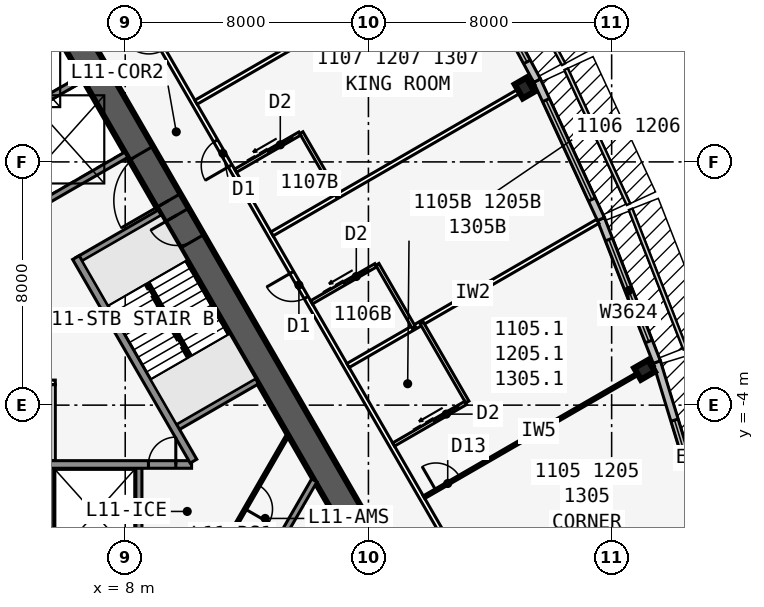
"""IFC4 building model, lengths in metres.
Left out: names, types, materials, properties, quantities, classifications, styles, units other than length and angle.
Written with IfcOpenShell. Run it as: python <this file> out.ifc"""

import sys

from ifc_helpers import new_model, si_unit, direction, frame, frame_2d, origin, origin_2d, place, context, subcontext, project, spatial, rectangle, i_section, extrude, element, fill, save


model = new_model("IFC4")
c1 = context("Model", 3, precision=1e-05, world=origin(), true_north=direction((0.0, 1.0)))
c2 = subcontext(c1, "Body", "Model", "MODEL_VIEW")
j1 = project(units=[si_unit("LENGTHUNIT", "METRE"), si_unit("PLANEANGLEUNIT", "RADIAN")], contexts=[c1])
p1 = place(None, origin())
s1 = spatial("IfcSite", under=j1, at=p1, CompositionType="ELEMENT")
p2 = place(p1, origin())
s2 = spatial("IfcBuilding", under=s1, at=p2, CompositionType="ELEMENT")
p3 = place(p2, frame((0.0, 0.0, 48.9)))
s3 = spatial("IfcBuildingStorey", under=s2, at=p3, CompositionType="ELEMENT", Elevation=48.9)
p4 = place(p3, frame((-0.55, -5.951, 0.0), z_axis=(0.0, 0.0, 1.0), x_axis=(1.0, 0.0, 0.0)))
e1 = element("IfcWall", 1, at=p4, inside=s3, PredefinedType="SOLIDWALL", context=c2, shape_type="SweptSolid", body=[
    extrude(rectangle(XDim=10.733, YDim=0.25, at=frame_2d((5.366, 0.0))), origin(), (0.0, 0.0, 1.0), 3.235),
])
p5 = place(p4, frame((9.314, 0.0, 0.0)))
e2 = element("IfcOpeningElement", 2, at=p5, cuts=e1, PredefinedType="OPENING", context=c2, shape_type="SweptSolid", body=[
    extrude(rectangle(XDim=0.9, YDim=2.13, at=frame_2d((0.45, 1.065))), frame((0.0, 0.135, 0.0), z_axis=(0.0, -1.0, 0.0), x_axis=(1.0, 0.0, 0.0)), (0.0, 0.0, 1.0), 0.27),
])
p6 = place(p4, frame((1.05, 0.0, 0.0)))
e3 = element("IfcOpeningElement", 3, at=p6, cuts=e1, PredefinedType="OPENING", context=c2, shape_type="SweptSolid", body=[
    extrude(rectangle(XDim=1.1, YDim=2.13, at=frame_2d((0.55, 1.065))), frame((0.0, 0.135, 0.0), z_axis=(0.0, -1.0, 0.0), x_axis=(1.0, 0.0, 0.0)), (0.0, 0.0, 1.0), 0.27),
])
p7 = place(p4, frame((4.05, 0.0, 0.0)))
e4 = element("IfcOpeningElement", 4, at=p7, cuts=e1, PredefinedType="OPENING", context=c2, shape_type="SweptSolid", body=[
    extrude(rectangle(XDim=1.1, YDim=2.13, at=frame_2d((0.55, 1.065))), frame((0.0, 0.135, 0.0), z_axis=(0.0, -1.0, 0.0), x_axis=(1.0, 0.0, 0.0)), (0.0, 0.0, 1.0), 0.27),
])
for number, where, z_axis, x_axis in (
    (5, (5.55, -5.951, 0.0), (0.0, 0.0, 1.0), (0.0, -1.0, 0.0)),
    (6, (8.45, -5.951, 0.0), (0.0, 0.0, 1.0), (0.0, -1.0, 0.0)),
):
    element("IfcWall", number, at=place(p3, frame(where, z_axis=z_axis, x_axis=x_axis)), inside=s3, PredefinedType="SOLIDWALL", context=c2, shape_type="SweptSolid", body=[
        extrude(rectangle(XDim=3.125, YDim=0.2, at=frame_2d((1.562, 0.0))), origin(), (0.0, 0.0, 1.0), 3.235),
    ])
p8 = place(p3, frame((16.5, -9.526, 0.0), z_axis=(0.0, 0.0, 1.0), x_axis=(-0.499999749417, 0.866025548458, 0.0)))
e7 = element("IfcWall", 7, at=p8, inside=s3, PredefinedType="SHEAR", context=c2, shape_type="SweptSolid", body=[
    extrude(rectangle(XDim=33.0, YDim=0.9, at=frame_2d((16.5, 0.0))), origin(), (0.0, 0.0, 1.0), 3.4),
])
p9 = place(p8, frame((14.15, 0.0, 0.0)))
e8 = element("IfcOpeningElement", 8, at=p9, cuts=e7, PredefinedType="OPENING", context=c2, shape_type="SweptSolid", body=[
    extrude(rectangle(XDim=1.8, YDim=2.13, at=frame_2d((0.9, 1.065))), frame((0.0, 0.46, 0.0), z_axis=(0.0, -1.0, 0.0), x_axis=(1.0, 0.0, 0.0)), (0.0, 0.0, 1.0), 0.92),
])
p10 = place(p8, frame((12.6, 0.0, 0.0)))
e9 = element("IfcOpeningElement", 9, at=p10, cuts=e7, PredefinedType="OPENING", context=c2, shape_type="SweptSolid", body=[
    extrude(rectangle(XDim=1.0, YDim=2.13, at=frame_2d((0.5, 1.065))), frame((0.0, 0.46, 0.0), z_axis=(0.0, -1.0, 0.0), x_axis=(1.0, 0.0, 0.0)), (0.0, 0.0, 1.0), 0.92),
])
p11 = place(p3, frame((10.245, -5.843, 0.0), z_axis=(0.0, 0.0, 1.0), x_axis=(-0.499993009313, 0.866029439822, 0.0)))
e10 = element("IfcWall", 10, at=p11, inside=s3, PredefinedType="SOLIDWALL", context=c2, shape_type="SweptSolid", body=[
    extrude(rectangle(XDim=7.733, YDim=0.25, at=frame_2d((3.866, 0.0))), origin(), (0.0, 0.0, 1.0), 3.235),
])
for number, where, z_axis, x_axis in (
    (11, (9.629, -4.775, 0.0), (0.0, 0.0, 1.0), (0.866, 0.5, 0.0)),
    (12, (6.429, 0.767, 0.0), (0.0, 0.0, 1.0), (0.866, 0.5, 0.0)),
    (13, (5.329, 2.673, 0.0), (0.0, 0.0, 1.0), (0.866, 0.5, 0.0)),
    (14, (3.879, 5.184, 0.0), (0.0, 0.0, 1.0), (0.866, 0.5, 0.0)),
):
    element("IfcWall", number, at=place(p3, frame(where, z_axis=z_axis, x_axis=x_axis)), inside=s3, PredefinedType="SOLIDWALL", context=c2, shape_type="SweptSolid", body=[
        extrude(rectangle(XDim=3.125, YDim=0.2, at=frame_2d((1.562, 0.0))), origin(), (0.0, 0.0, 1.0), 3.235),
    ])
for number, where, z_axis, x_axis in (
    (15, (25.083, -2.839, 0.0), (0.0, 0.0, 1.0), (-0.5, 0.866, 0.0)),
    (16, (21.137, 6.43, 0.0), (0.0, 0.0, 1.0), (0.866, 0.5, 0.0)),
):
    element("IfcColumn", number, at=place(p3, frame(where, z_axis=z_axis, x_axis=x_axis)), inside=s3, PredefinedType="COLUMN", context=c2, shape_type="SweptSolid", body=[
        extrude(i_section(OverallWidth=0.442, OverallDepth=0.531, WebThickness=0.066, FlangeThickness=0.106, at=origin_2d()), origin(), (0.0, 0.0, 1.0), 3.4),
    ])
p12 = place(p3, frame((15.312, 8.84, 0.0), z_axis=(0.0, 0.0, 1.0), x_axis=(0.866025403784, 0.5, 0.0)))
e17 = element("IfcColumn", 17, at=p12, inside=s3, PredefinedType="COLUMN", context=c2, shape_type="SweptSolid", body=[
    extrude(rectangle(XDim=2.4, YDim=2.4, at=origin_2d()), origin(), (0.0, 0.0, 1.0), 3.4),
])
p13 = place(p3, frame((27.88, -10.429, 0.0), z_axis=(0.0, 0.0, 1.0), x_axis=(-0.2919790669, 0.956424709265, 0.0)))
e18 = element("IfcWall", 18, at=p13, inside=s3, PredefinedType="STANDARD", context=c2, shape_type="SweptSolid", body=[
    extrude(rectangle(XDim=8.211, YDim=0.25, at=frame_2d((4.105, 0.0))), origin(), (0.0, 0.0, 1.0), 3.235),
])
p14 = place(p13, frame((2.006, 0.0, 0.45)))
e19 = element("IfcOpeningElement", 19, at=p14, cuts=e18, PredefinedType="OPENING", context=c2, shape_type="SweptSolid", body=[
    extrude(rectangle(XDim=4.2, YDim=2.4, at=frame_2d((2.1, 1.2))), frame((0.0, 0.135, 0.0), z_axis=(0.0, -1.0, 0.0), x_axis=(1.0, 0.0, 0.0)), (0.0, 0.0, 1.0), 0.27),
])
p15 = place(p3, frame((25.486, -2.584, 0.0), z_axis=(0.0, 0.0, 1.0), x_axis=(-0.364013463868, 0.931393685894, 0.0)))
e20 = element("IfcWall", 20, at=p15, inside=s3, PredefinedType="STANDARD", context=c2, shape_type="SweptSolid", body=[
    extrude(rectangle(XDim=5.058, YDim=0.25, at=frame_2d((2.529, 0.0))), origin(), (0.0, 0.0, 1.0), 3.235),
])
p16 = place(p15, frame((0.729, 0.0, 0.45)))
e21 = element("IfcOpeningElement", 21, at=p16, cuts=e20, PredefinedType="OPENING", context=c2, shape_type="SweptSolid", body=[
    extrude(rectangle(XDim=3.6, YDim=2.4, at=frame_2d((1.8, 1.2))), frame((0.0, 0.135, 0.0), z_axis=(0.0, -1.0, 0.0), x_axis=(1.0, 0.0, 0.0)), (0.0, 0.0, 1.0), 0.27),
])
p17 = place(p3, frame((23.648, 2.119, 0.0), z_axis=(0.0, 0.0, 1.0), x_axis=(-0.419203100754, 0.907892482796, 0.0)))
e22 = element("IfcWall", 22, at=p17, inside=s3, PredefinedType="STANDARD", context=c2, shape_type="SweptSolid", body=[
    extrude(rectangle(XDim=5.021, YDim=0.25, at=frame_2d((2.51, 0.0))), origin(), (0.0, 0.0, 1.0), 3.235),
])
p18 = place(p17, frame((0.71, 0.0, 0.45)))
e23 = element("IfcOpeningElement", 23, at=p18, cuts=e22, PredefinedType="OPENING", context=c2, shape_type="SweptSolid", body=[
    extrude(rectangle(XDim=3.6, YDim=2.4, at=frame_2d((1.8, 1.2))), frame((0.0, 0.135, 0.0), z_axis=(0.0, -1.0, 0.0), x_axis=(1.0, 0.0, 0.0)), (0.0, 0.0, 1.0), 0.27),
])
p19 = place(p3, frame((21.547, 6.671, 0.0), z_axis=(0.0, 0.0, 1.0), x_axis=(-0.473412820489, 0.880840678782, 0.0)))
e24 = element("IfcWall", 24, at=p19, inside=s3, PredefinedType="STANDARD", context=c2, shape_type="SweptSolid", body=[
    extrude(rectangle(XDim=5.002, YDim=0.25, at=frame_2d((2.501, 0.0))), origin(), (0.0, 0.0, 1.0), 3.235),
])
p20 = place(p19, frame((0.701, 0.0, 0.45)))
e25 = element("IfcOpeningElement", 25, at=p20, cuts=e24, PredefinedType="OPENING", context=c2, shape_type="SweptSolid", body=[
    extrude(rectangle(XDim=3.6, YDim=2.4, at=frame_2d((1.8, 1.2))), frame((0.0, 0.135, 0.0), z_axis=(0.0, -1.0, 0.0), x_axis=(1.0, 0.0, 0.0)), (0.0, 0.0, 1.0), 0.27),
])
p21 = place(p3, frame((20.027, -10.985, 0.0), z_axis=(0.0, 0.0, 1.0), x_axis=(-0.500001677587, 0.866024435227, 0.0)))
e26 = element("IfcWall", 26, at=p21, inside=s3, PredefinedType="PARTITIONING", context=c2, shape_type="SweptSolid", body=[
    extrude(rectangle(XDim=39.054, YDim=0.15, at=frame_2d((19.527, 0.0))), origin(), (0.0, 0.0, 1.0), 3.235),
])
p22 = place(p21, frame((1.558, 0.0, 0.0)))
e27 = element("IfcOpeningElement", 27, at=p22, cuts=e26, PredefinedType="OPENING", context=c2, shape_type="SweptSolid", body=[
    extrude(rectangle(XDim=0.95, YDim=2.13, at=frame_2d((0.475, 1.065))), frame((0.0, 0.085, 0.0), z_axis=(0.0, -1.0, 0.0), x_axis=(1.0, 0.0, 0.0)), (0.0, 0.0, 1.0), 0.17),
])
p23 = place(p21, frame((12.152, 0.0, 0.0)))
e28 = element("IfcOpeningElement", 28, at=p23, cuts=e26, PredefinedType="OPENING", context=c2, shape_type="SweptSolid", body=[
    extrude(rectangle(XDim=0.95, YDim=2.13, at=frame_2d((0.475, 1.065))), frame((0.0, 0.085, 0.0), z_axis=(0.0, -1.0, 0.0), x_axis=(1.0, 0.0, 0.0)), (0.0, 0.0, 1.0), 0.17),
])
p24 = place(p21, frame((17.152, 0.0, 0.0)))
e29 = element("IfcOpeningElement", 29, at=p24, cuts=e26, PredefinedType="OPENING", context=c2, shape_type="SweptSolid", body=[
    extrude(rectangle(XDim=0.95, YDim=2.13, at=frame_2d((0.475, 1.065))), frame((0.0, 0.085, 0.0), z_axis=(0.0, -1.0, 0.0), x_axis=(1.0, 0.0, 0.0)), (0.0, 0.0, 1.0), 0.17),
])
p25 = place(p21, frame((21.552, 0.0, 0.0)))
e30 = element("IfcOpeningElement", 30, at=p25, cuts=e26, PredefinedType="OPENING", context=c2, shape_type="SweptSolid", body=[
    extrude(rectangle(XDim=0.95, YDim=2.13, at=frame_2d((0.475, 1.065))), frame((0.0, 0.085, 0.0), z_axis=(0.0, -1.0, 0.0), x_axis=(1.0, 0.0, 0.0)), (0.0, 0.0, 1.0), 0.17),
])
p26 = place(p21, frame((32.152, 0.0, 0.0)))
e31 = element("IfcOpeningElement", 31, at=p26, cuts=e26, PredefinedType="OPENING", context=c2, shape_type="SweptSolid", body=[
    extrude(rectangle(XDim=0.95, YDim=2.13, at=frame_2d((0.475, 1.065))), frame((0.0, 0.085, 0.0), z_axis=(0.0, -1.0, 0.0), x_axis=(1.0, 0.0, 0.0)), (0.0, 0.0, 1.0), 0.17),
])
p27 = place(p21, frame((37.752, 0.0, 0.0)))
e32 = element("IfcOpeningElement", 32, at=p27, cuts=e26, PredefinedType="OPENING", context=c2, shape_type="SweptSolid", body=[
    extrude(rectangle(XDim=0.95, YDim=2.13, at=frame_2d((0.475, 1.065))), frame((0.0, 0.085, 0.0), z_axis=(0.0, -1.0, 0.0), x_axis=(1.0, 0.0, 0.0)), (0.0, 0.0, 1.0), 0.17),
])
p28 = place(p3, frame((17.829, -7.027, 0.0), z_axis=(0.0, 0.0, 1.0), x_axis=(0.866032659912, 0.499987431809, 0.0)))
e33 = element("IfcWall", 33, at=p28, inside=s3, PredefinedType="PARTITIONING", context=c2, shape_type="SweptSolid", body=[
    extrude(rectangle(XDim=8.72, YDim=0.1, at=frame_2d((4.36, 0.0))), origin(), (0.0, 0.0, 1.0), 2.389),
])
p29 = place(p28, frame((0.45, 0.0, 0.0)))
e34 = element("IfcOpeningElement", 34, at=p29, cuts=e33, PredefinedType="OPENING", context=c2, shape_type="SweptSolid", body=[
    extrude(rectangle(XDim=0.9, YDim=2.13, at=frame_2d((0.45, 1.065))), frame((0.0, 0.06, 0.0), z_axis=(0.0, -1.0, 0.0), x_axis=(1.0, 0.0, 0.0)), (0.0, 0.0, 1.0), 0.12),
])
p30 = place(p3, frame((15.329, -2.697, 0.0), z_axis=(0.0, 0.0, 1.0), x_axis=(0.866018409083, 0.500012114982, 0.0)))
e35 = element("IfcWall", 35, at=p30, inside=s3, PredefinedType="PARTITIONING", context=c2, shape_type="SweptSolid", body=[
    extrude(rectangle(XDim=9.485, YDim=0.15, at=frame_2d((4.742, 0.0))), origin(), (0.0, 0.0, 1.0), 2.389),
])
p31 = place(p3, frame((12.829, 1.633, 0.0), z_axis=(0.0, 0.0, 1.0), x_axis=(0.866026934769, 0.499997348248, 0.0)))
e36 = element("IfcWall", 36, at=p31, inside=s3, PredefinedType="PARTITIONING", context=c2, shape_type="SweptSolid", body=[
    extrude(rectangle(XDim=9.943, YDim=0.15, at=frame_2d((4.971, 0.0))), origin(), (0.0, 0.0, 1.0), 2.389),
])
p32 = place(p3, frame((10.329, 5.963, 0.0), z_axis=(0.0, 0.0, 1.0), x_axis=(0.866021688545, 0.500006434927, 0.0)))
e37 = element("IfcWall", 37, at=p32, inside=s3, PredefinedType="PARTITIONING", context=c2, shape_type="SweptSolid", body=[
    extrude(rectangle(XDim=10.096, YDim=0.15, at=frame_2d((5.048, 0.0))), origin(), (0.0, 0.0, 1.0), 2.389),
])
p33 = place(p3, frame((19.253, -3.895, 0.0), z_axis=(0.0, 0.0, 1.0), x_axis=(-0.499990139034, 0.866031096941, 0.0)))
e38 = element("IfcWall", 38, at=p33, inside=s3, PredefinedType="PLUMBINGWALL", context=c2, shape_type="SweptSolid", body=[
    extrude(rectangle(XDim=3.0, YDim=0.12, at=frame_2d((1.5, 0.0))), origin(), (0.0, 0.0, 1.0), 3.235),
])
p34 = place(p3, frame((16.829, -5.295, 0.0), z_axis=(0.0, 0.0, 1.0), x_axis=(0.866035715982, 0.499982138324, 0.0)))
e39 = element("IfcWall", 39, at=p34, inside=s3, PredefinedType="PLUMBINGWALL", context=c2, shape_type="SweptSolid", body=[
    extrude(rectangle(XDim=2.74, YDim=0.12, at=frame_2d((1.37, 0.0))), origin(), (0.0, 0.0, 1.0), 3.235),
])
p35 = place(p34, frame((1.55, 0.0, 0.0)))
e40 = element("IfcOpeningElement", 40, at=p35, cuts=e39, PredefinedType="OPENING", context=c2, shape_type="SweptSolid", body=[
    extrude(rectangle(XDim=0.9, YDim=2.13, at=frame_2d((0.45, 1.065))), frame((0.0, 0.07, 0.0), z_axis=(0.0, -1.0, 0.0), x_axis=(1.0, 0.0, 0.0)), (0.0, 0.0, 1.0), 0.14),
])
p36 = place(p3, frame((17.493, -1.447, 0.0), z_axis=(0.0, 0.0, 1.0), x_axis=(-0.500001309137, 0.866024647952, 0.0)))
e41 = element("IfcWall", 41, at=p36, inside=s3, PredefinedType="PLUMBINGWALL", context=c2, shape_type="SweptSolid", body=[
    extrude(rectangle(XDim=2.4, YDim=0.12, at=frame_2d((1.2, 0.0))), origin(), (0.0, 0.0, 1.0), 3.235),
])
p37 = place(p3, frame((14.128, -0.619, 0.0), z_axis=(0.0, 0.0, 1.0), x_axis=(0.866048967903, 0.499959183527, 0.0)))
e42 = element("IfcWall", 42, at=p37, inside=s3, PredefinedType="PLUMBINGWALL", context=c2, shape_type="SweptSolid", body=[
    extrude(rectangle(XDim=2.44, YDim=0.12, at=frame_2d((1.22, 0.0))), origin(), (0.0, 0.0, 1.0), 3.235),
])
p38 = place(p37, frame((1.25, 0.0, 0.0)))
e43 = element("IfcOpeningElement", 43, at=p38, cuts=e42, PredefinedType="OPENING", context=c2, shape_type="SweptSolid", body=[
    extrude(rectangle(XDim=0.9, YDim=2.13, at=frame_2d((0.45, 1.065))), frame((0.0, 0.07, 0.0), z_axis=(0.0, -1.0, 0.0), x_axis=(1.0, 0.0, 0.0)), (0.0, 0.0, 1.0), 0.14),
])
p39 = place(p3, frame((14.993, 2.883, 0.0), z_axis=(0.0, 0.0, 1.0), x_axis=(-0.500001309137, 0.866024647952, 0.0)))
e44 = element("IfcWall", 44, at=p39, inside=s3, PredefinedType="PLUMBINGWALL", context=c2, shape_type="SweptSolid", body=[
    extrude(rectangle(XDim=2.4, YDim=0.12, at=frame_2d((1.2, 0.0))), origin(), (0.0, 0.0, 1.0), 3.235),
])
p40 = place(p3, frame((11.628, 3.711, 0.0), z_axis=(0.0, 0.0, 1.0), x_axis=(0.866048967903, 0.499959183527, 0.0)))
e45 = element("IfcWall", 45, at=p40, inside=s3, PredefinedType="PLUMBINGWALL", context=c2, shape_type="SweptSolid", body=[
    extrude(rectangle(XDim=2.44, YDim=0.12, at=frame_2d((1.22, 0.0))), origin(), (0.0, 0.0, 1.0), 3.235),
])
p41 = place(p40, frame((1.25, 0.0, 0.0)))
e46 = element("IfcOpeningElement", 46, at=p41, cuts=e45, PredefinedType="OPENING", context=c2, shape_type="SweptSolid", body=[
    extrude(rectangle(XDim=0.9, YDim=2.13, at=frame_2d((0.45, 1.065))), frame((0.0, 0.07, 0.0), z_axis=(0.0, -1.0, 0.0), x_axis=(1.0, 0.0, 0.0)), (0.0, 0.0, 1.0), 0.14),
])
p42 = place(p3, frame((-2.65, -3.251, 0.0), z_axis=(0.0, 0.0, 1.0), x_axis=(1.0, 0.0, 0.0)))
e47 = element("IfcWall", 47, at=p42, inside=s3, PredefinedType="PARTITIONING", context=c2, shape_type="SweptSolid", body=[
    extrude(rectangle(XDim=8.35, YDim=0.15, at=frame_2d((4.175, 0.0))), origin(), (0.0, 0.0, 1.0), 3.235),
])
p43 = place(p3, frame((5.625, -5.826, 0.0), z_axis=(0.0, 0.0, 1.0), x_axis=(0.0, 1.0, 0.0)))
e48 = element("IfcWall", 48, at=p43, inside=s3, PredefinedType="PARTITIONING", context=c2, shape_type="SweptSolid", body=[
    extrude(rectangle(XDim=2.5, YDim=0.15, at=frame_2d((1.25, 0.0))), origin(), (0.0, 0.0, 1.0), 3.235),
])
p44 = place(p3, frame((14.219, -6.476, 0.0), z_axis=(0.0, 0.0, 1.0), x_axis=(-0.499952404951, -0.866052881055, 0.0)))
e49 = element("IfcWall", 49, at=p44, inside=s3, PredefinedType="SOLIDWALL", context=c2, shape_type="SweptSolid", body=[
    extrude(rectangle(XDim=3.002, YDim=0.2, at=frame_2d((1.501, 0.0))), origin(), (0.0, 0.0, 1.0), 3.235),
])
p45 = place(p3, frame((13.354, -4.976, 0.0), z_axis=(0.0, 0.0, 1.0), x_axis=(-0.499999210213, -0.866025859768, 0.0)))
e50 = element("IfcWall", 50, at=p45, inside=s3, PredefinedType="PARTITIONING", context=c2, shape_type="SweptSolid", body=[
    extrude(rectangle(XDim=4.734, YDim=0.1, at=frame_2d((2.367, 0.0))), origin(), (0.0, 0.0, 1.0), 3.235),
])
p46 = place(p45, frame((1.917, 0.0, 0.0)))
e51 = element("IfcOpeningElement", 51, at=p46, cuts=e50, PredefinedType="OPENING", context=c2, shape_type="SweptSolid", body=[
    extrude(rectangle(XDim=0.9, YDim=2.13, at=frame_2d((0.45, 1.065))), frame((0.0, 0.06, 0.0), z_axis=(0.0, -1.0, 0.0), x_axis=(1.0, 0.0, 0.0)), (0.0, 0.0, 1.0), 0.12),
])
p47 = place(p3, frame((10.135, -2.401, 0.0), z_axis=(0.0, 0.0, 1.0), x_axis=(-0.499992232847, 0.866029888106, 0.0)))
e52 = element("IfcWall", 52, at=p47, inside=s3, PredefinedType="SOLIDWALL", context=c2, shape_type="SweptSolid", body=[
    extrude(rectangle(XDim=2.794, YDim=0.1, at=frame_2d((1.397, 0.0))), origin(), (0.0, 0.0, 1.0), 3.4),
])
p48 = place(p14, origin())
e53 = element("IfcWindow", 53, at=p48, inside=s3, PartitioningType="SINGLE_PANEL", PredefinedType="WINDOW", context=c2, shape_type="SweptSolid", body=[
    extrude(rectangle(XDim=4.2, YDim=2.4, at=frame_2d((2.1, 1.2))), frame((0.0, 0.03, 0.0), z_axis=(0.0, -1.0, 0.0), x_axis=(1.0, 0.0, 0.0)), (0.0, 0.0, 1.0), 0.06),
])
fill(e19, e53)
p49 = place(p16, origin())
e54 = element("IfcWindow", 54, at=p49, inside=s3, PartitioningType="SINGLE_PANEL", PredefinedType="WINDOW", context=c2, shape_type="SweptSolid", body=[
    extrude(rectangle(XDim=3.6, YDim=2.4, at=frame_2d((1.8, 1.2))), frame((0.0, 0.03, 0.0), z_axis=(0.0, -1.0, 0.0), x_axis=(1.0, 0.0, 0.0)), (0.0, 0.0, 1.0), 0.06),
])
fill(e21, e54)
p50 = place(p18, origin())
e55 = element("IfcWindow", 55, at=p50, inside=s3, PartitioningType="SINGLE_PANEL", PredefinedType="WINDOW", context=c2, shape_type="SweptSolid", body=[
    extrude(rectangle(XDim=3.6, YDim=2.4, at=frame_2d((1.8, 1.2))), frame((0.0, 0.03, 0.0), z_axis=(0.0, -1.0, 0.0), x_axis=(1.0, 0.0, 0.0)), (0.0, 0.0, 1.0), 0.06),
])
fill(e23, e55)
p51 = place(p20, origin())
e56 = element("IfcWindow", 56, at=p51, inside=s3, PartitioningType="SINGLE_PANEL", PredefinedType="WINDOW", context=c2, shape_type="SweptSolid", body=[
    extrude(rectangle(XDim=3.6, YDim=2.4, at=frame_2d((1.8, 1.2))), frame((0.0, 0.03, 0.0), z_axis=(0.0, -1.0, 0.0), x_axis=(1.0, 0.0, 0.0)), (0.0, 0.0, 1.0), 0.06),
])
fill(e25, e56)
p52 = place(p29, origin())
e57 = element("IfcDoor", 57, at=p52, inside=s3, OperationType="SINGLE_SWING_LEFT", PredefinedType="DOOR", context=c2, shape_type="SweptSolid", body=[
    extrude(rectangle(XDim=0.9, YDim=2.13, at=frame_2d((0.45, 1.065))), frame((0.0, 0.025, 0.0), z_axis=(0.0, -1.0, 0.0), x_axis=(1.0, 0.0, 0.0)), (0.0, 0.0, 1.0), 0.05),
])
fill(e34, e57)
p53 = place(p35, origin())
e58 = element("IfcDoor", 58, at=p53, inside=s3, OperationType="SLIDING_TO_LEFT", PredefinedType="DOOR", context=c2, shape_type="SweptSolid", body=[
    extrude(rectangle(XDim=0.9, YDim=2.13, at=frame_2d((0.45, 1.065))), frame((0.0, 0.025, 0.0), z_axis=(0.0, -1.0, 0.0), x_axis=(1.0, 0.0, 0.0)), (0.0, 0.0, 1.0), 0.05),
])
fill(e40, e58)
p54 = place(p38, origin())
e59 = element("IfcDoor", 59, at=p54, inside=s3, OperationType="SLIDING_TO_LEFT", PredefinedType="DOOR", context=c2, shape_type="SweptSolid", body=[
    extrude(rectangle(XDim=0.9, YDim=2.13, at=frame_2d((0.45, 1.065))), frame((0.0, 0.025, 0.0), z_axis=(0.0, -1.0, 0.0), x_axis=(1.0, 0.0, 0.0)), (0.0, 0.0, 1.0), 0.05),
])
fill(e43, e59)
p55 = place(p23, origin())
e60 = element("IfcDoor", 60, at=p55, inside=s3, OperationType="SINGLE_SWING_RIGHT", PredefinedType="DOOR", context=c2, shape_type="SweptSolid", body=[
    extrude(rectangle(XDim=0.95, YDim=2.13, at=frame_2d((0.475, 1.065))), frame((0.0, 0.025, 0.0), z_axis=(0.0, -1.0, 0.0), x_axis=(1.0, 0.0, 0.0)), (0.0, 0.0, 1.0), 0.05),
])
fill(e28, e60)
p56 = place(p41, origin())
e61 = element("IfcDoor", 61, at=p56, inside=s3, OperationType="SLIDING_TO_LEFT", PredefinedType="DOOR", context=c2, shape_type="SweptSolid", body=[
    extrude(rectangle(XDim=0.9, YDim=2.13, at=frame_2d((0.45, 1.065))), frame((0.0, 0.025, 0.0), z_axis=(0.0, -1.0, 0.0), x_axis=(1.0, 0.0, 0.0)), (0.0, 0.0, 1.0), 0.05),
])
fill(e46, e61)
p57 = place(p24, origin())
e62 = element("IfcDoor", 62, at=p57, inside=s3, OperationType="SINGLE_SWING_LEFT", PredefinedType="DOOR", context=c2, shape_type="SweptSolid", body=[
    extrude(rectangle(XDim=0.95, YDim=2.13, at=frame_2d((0.475, 1.065))), frame((0.0, 0.025, 0.0), z_axis=(0.0, -1.0, 0.0), x_axis=(1.0, 0.0, 0.0)), (0.0, 0.0, 1.0), 0.05),
])
fill(e29, e62)
p58 = place(p9, origin())
e63 = element("IfcDoor", 63, at=p58, inside=s3, OperationType="DOUBLE_DOOR_SINGLE_SWING", PredefinedType="DOOR", context=c2, shape_type="SweptSolid", body=[
    extrude(rectangle(XDim=1.8, YDim=2.13, at=frame_2d((0.9, 1.065))), frame((0.0, 0.025, 0.0), z_axis=(0.0, -1.0, 0.0), x_axis=(1.0, 0.0, 0.0)), (0.0, 0.0, 1.0), 0.05),
])
fill(e8, e63)
p59 = place(p10, origin())
e64 = element("IfcDoor", 64, at=p59, inside=s3, OperationType="SINGLE_SWING_RIGHT", PredefinedType="DOOR", context=c2, shape_type="SweptSolid", body=[
    extrude(rectangle(XDim=1.0, YDim=2.13, at=frame_2d((0.5, 1.065))), frame((0.0, 0.025, 0.0), z_axis=(0.0, -1.0, 0.0), x_axis=(1.0, 0.0, 0.0)), (0.0, 0.0, 1.0), 0.05),
])
fill(e9, e64)
p60 = place(p46, origin())
e65 = element("IfcDoor", 65, at=p60, inside=s3, OperationType="SINGLE_SWING_RIGHT", PredefinedType="DOOR", context=c2, shape_type="SweptSolid", body=[
    extrude(rectangle(XDim=0.9, YDim=2.13, at=frame_2d((0.45, 1.065))), frame((0.0, 0.025, 0.0), z_axis=(0.0, -1.0, 0.0), x_axis=(1.0, 0.0, 0.0)), (0.0, 0.0, 1.0), 0.05),
])
fill(e51, e65)
p61 = place(p5, origin())
e66 = element("IfcDoor", 66, at=p61, inside=s3, OperationType="SINGLE_SWING_RIGHT", PredefinedType="DOOR", context=c2, shape_type="SweptSolid", body=[
    extrude(rectangle(XDim=0.9, YDim=2.13, at=frame_2d((0.45, 1.065))), frame((0.0, 0.025, 0.0), z_axis=(0.0, -1.0, 0.0), x_axis=(1.0, 0.0, 0.0)), (0.0, 0.0, 1.0), 0.05),
])
fill(e2, e66)
save(model, sys.argv[1])
